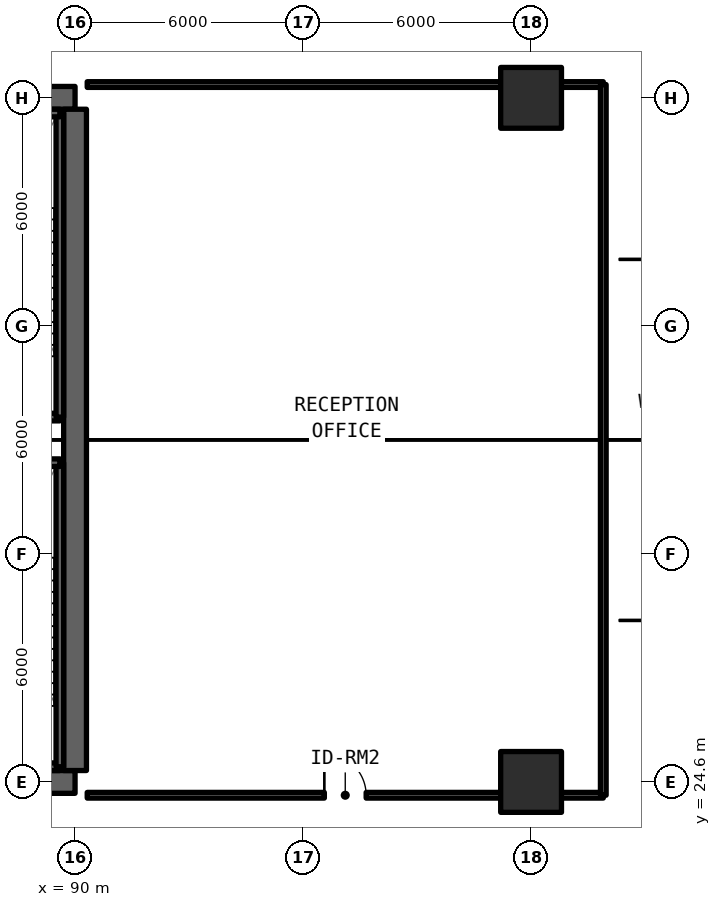
"""IFC4 building model, lengths in metres.
Left out: names, types, materials, properties, quantities, classifications, styles, units other than length and angle.
Written with IfcOpenShell. Run it as: python <this file> out.ifc"""

import sys

from ifc_helpers import new_model, si_unit, direction, frame, frame_2d, origin, origin_2d, place, context, subcontext, project, spatial, rectangle, extrude, element, fill, save


model = new_model("IFC4")
c1 = context("Model", 3, precision=1e-05, world=origin(), true_north=direction((0.0, 1.0)))
c2 = subcontext(c1, "Body", "Model", "MODEL_VIEW")
j1 = project(units=[si_unit("LENGTHUNIT", "METRE"), si_unit("PLANEANGLEUNIT", "RADIAN")], contexts=[c1])
p1 = place(None, origin())
s1 = spatial("IfcSite", under=j1, at=p1, CompositionType="ELEMENT")
p2 = place(p1, origin())
s2 = spatial("IfcBuilding", under=s1, at=p2, CompositionType="ELEMENT")
p3 = place(p2, frame((0.0, 0.0, 19.47)))
s3 = spatial("IfcBuildingStorey", under=s2, at=p3, CompositionType="ELEMENT", Elevation=19.47)
for number, where, z_axis, x_axis in (
    (1, (78.0, 24.6, 0.0), (0.0, 0.0, 1.0), (1.0, 0.0, 0.0)),
    (2, (90.0, 42.6, 0.0), (0.0, 0.0, 1.0), (-1.0, 0.0, 0.0)),
):
    element("IfcWall", number, at=place(p3, frame(where, z_axis=z_axis, x_axis=x_axis)), inside=s3, PredefinedType="SHEAR", context=c2, shape_type="SweptSolid", body=[
        extrude(rectangle(XDim=12.0, YDim=0.6, at=frame_2d((6.0, 0.0))), origin(), (0.0, 0.0, 1.0), 4.62),
    ])
p4 = place(p3, frame((90.0, 24.9, 0.0), z_axis=(0.0, 0.0, 1.0), x_axis=(0.0, 1.0, 0.0)))
e3 = element("IfcWall", 3, at=p4, inside=s3, PredefinedType="SHEAR", context=c2, shape_type="SweptSolid", body=[
    extrude(rectangle(XDim=17.4, YDim=0.6, at=frame_2d((8.7, 0.0))), origin(), (0.0, 0.0, 1.0), 4.62),
])
for number, where, z_axis, x_axis in (
    (4, (102.0, 24.6, 0.0), (0.0, 0.0, 1.0), (1.0, 0.0, 0.0)),
    (5, (102.0, 42.6, 0.0), (0.0, 0.0, 1.0), (1.0, 0.0, 0.0)),
):
    element("IfcColumn", number, at=place(p3, frame(where, z_axis=z_axis, x_axis=x_axis)), inside=s3, PredefinedType="COLUMN", context=c2, shape_type="SweptSolid", body=[
        extrude(rectangle(XDim=1.6, YDim=1.6, at=origin_2d()), origin(), (0.0, 0.0, 1.0), 4.62),
    ])
p5 = place(p3, frame((90.32, 24.25, 0.0), z_axis=(0.0, 0.0, 1.0), x_axis=(1.0, 0.0, 0.0)))
e6 = element("IfcWall", 6, at=p5, inside=s3, PredefinedType="SOLIDWALL", context=c2, shape_type="SweptSolid", body=[
    extrude(rectangle(XDim=13.58, YDim=0.15, at=frame_2d((6.79, 0.0))), origin(), (0.0, 0.0, 1.0), 3.49),
])
p6 = place(p5, frame((6.24, 0.0, 0.0)))
e7 = element("IfcOpeningElement", 7, at=p6, cuts=e6, PredefinedType="OPENING", context=c2, shape_type="SweptSolid", body=[
    extrude(rectangle(XDim=1.1, YDim=2.15, at=frame_2d((0.55, 1.075))), frame((0.0, 0.085, 0.0), z_axis=(0.0, -1.0, 0.0), x_axis=(1.0, 0.0, 0.0)), (0.0, 0.0, 1.0), 0.17),
])
p7 = place(p3, frame((90.32, 42.95, 0.0), z_axis=(0.0, 0.0, 1.0), x_axis=(1.0, 0.0, 0.0)))
e8 = element("IfcWall", 8, at=p7, inside=s3, PredefinedType="SOLIDWALL", context=c2, shape_type="SweptSolid", body=[
    extrude(rectangle(XDim=13.58, YDim=0.15, at=frame_2d((6.79, 0.0))), origin(), (0.0, 0.0, 1.0), 3.49),
])
p8 = place(p3, frame((103.9, 24.25, 0.0), z_axis=(0.0, 0.0, 1.0), x_axis=(0.0, 1.0, 0.0)))
e9 = element("IfcWall", 9, at=p8, inside=s3, PredefinedType="SOLIDWALL", context=c2, shape_type="SweptSolid", body=[
    extrude(rectangle(XDim=18.7, YDim=0.15, at=frame_2d((9.35, 0.0))), origin(), (0.0, 0.0, 1.0), 3.49),
])
p9 = place(p3, frame((86.2, 25.0, 0.0), z_axis=(0.0, 0.0, 1.0), x_axis=(1.0, 0.0, 0.0)))
e10 = element("IfcWall", 10, at=p9, inside=s3, PredefinedType="SOLIDWALL", context=c2, shape_type="SweptSolid", body=[
    extrude(rectangle(XDim=3.4, YDim=0.2, at=frame_2d((1.7, 0.0))), origin(), (0.0, 0.0, 1.0), 4.62),
])
p10 = place(p3, frame((89.6, 25.0, 0.0), z_axis=(0.0, 0.0, 1.0), x_axis=(0.0, 1.0, 0.0)))
e11 = element("IfcWall", 11, at=p10, inside=s3, PredefinedType="SOLIDWALL", context=c2, shape_type="SweptSolid", body=[
    extrude(rectangle(XDim=8.0, YDim=0.2, at=frame_2d((4.0, 0.0))), origin(), (0.0, 0.0, 1.0), 4.62),
])
for number, where, z_axis, x_axis in (
    (12, (89.6, 33.0, 0.0), (0.0, 0.0, 1.0), (-1.0, 0.0, 0.0)),
    (13, (86.2, 34.2, 0.0), (0.0, 0.0, 1.0), (1.0, 0.0, 0.0)),
):
    element("IfcWall", number, at=place(p3, frame(where, z_axis=z_axis, x_axis=x_axis)), inside=s3, PredefinedType="SOLIDWALL", context=c2, shape_type="SweptSolid", body=[
        extrude(rectangle(XDim=3.4, YDim=0.2, at=frame_2d((1.7, 0.0))), origin(), (0.0, 0.0, 1.0), 4.62),
    ])
p11 = place(p3, frame((89.6, 34.2, 0.0), z_axis=(0.0, 0.0, 1.0), x_axis=(0.0, 1.0, 0.0)))
e14 = element("IfcWall", 14, at=p11, inside=s3, PredefinedType="SOLIDWALL", context=c2, shape_type="SweptSolid", body=[
    extrude(rectangle(XDim=8.0, YDim=0.2, at=frame_2d((4.0, 0.0))), origin(), (0.0, 0.0, 1.0), 4.62),
])
p12 = place(p3, frame((89.6, 42.2, 0.0), z_axis=(0.0, 0.0, 1.0), x_axis=(-1.0, 0.0, 0.0)))
e15 = element("IfcWall", 15, at=p12, inside=s3, PredefinedType="SOLIDWALL", context=c2, shape_type="SweptSolid", body=[
    extrude(rectangle(XDim=3.4, YDim=0.2, at=frame_2d((1.7, 0.0))), origin(), (0.0, 0.0, 1.0), 4.62),
])
p13 = place(p6, origin())
e16 = element("IfcDoor", 16, at=p13, inside=s3, OperationType="SINGLE_SWING_LEFT", PredefinedType="DOOR", context=c2, shape_type="SweptSolid", body=[
    extrude(rectangle(XDim=1.1, YDim=2.15, at=frame_2d((0.55, 1.075))), frame((0.0, 0.025, 0.0), z_axis=(0.0, -1.0, 0.0), x_axis=(1.0, 0.0, 0.0)), (0.0, 0.0, 1.0), 0.05),
])
fill(e7, e16)
save(model, sys.argv[1])
